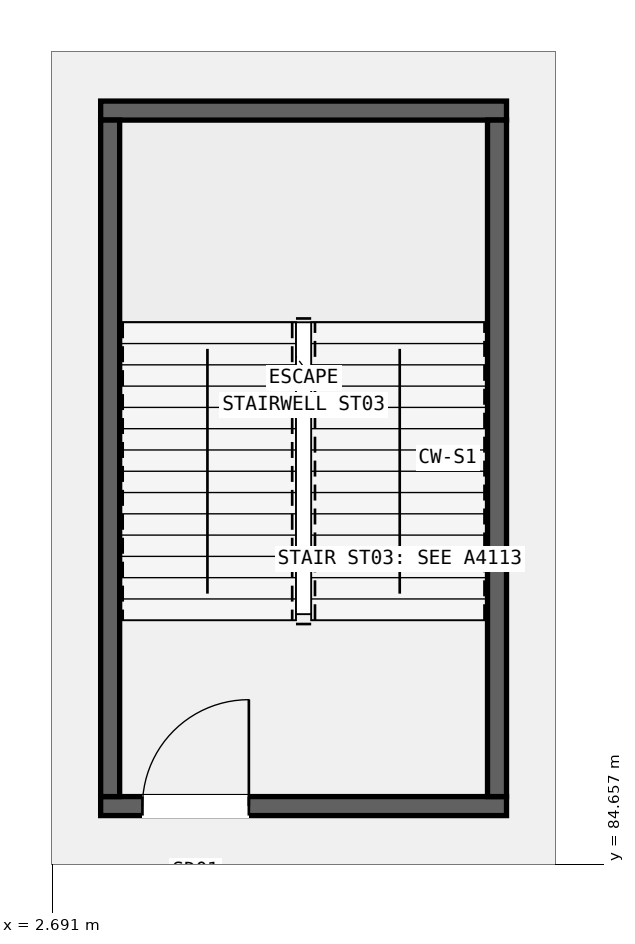
"""IFC4 building model, lengths in metres.
Left out: names, types, materials, properties, quantities, classifications, styles, units other than length and angle.
Written with IfcOpenShell. Run it as: python <this file> out.ifc"""

import sys

from ifc_helpers import new_model, si_unit, direction, frame, frame_2d, origin, place, context, subcontext, project, spatial, rectangle, extrude, element, fill, save


model = new_model("IFC4")
c1 = context("Model", 3, precision=1e-05, world=origin(), true_north=direction((0.0, 1.0)))
c2 = subcontext(c1, "Body", "Model", "MODEL_VIEW")
j1 = project(units=[si_unit("LENGTHUNIT", "METRE"), si_unit("PLANEANGLEUNIT", "RADIAN")], contexts=[c1])
p1 = place(None, origin())
s1 = spatial("IfcSite", under=j1, at=p1, CompositionType="ELEMENT")
p2 = place(p1, origin())
s2 = spatial("IfcBuilding", under=s1, at=p2, CompositionType="ELEMENT")
p3 = place(p2, frame((0.0, 0.0, 10.2)))
s3 = spatial("IfcBuildingStorey", under=s2, at=p3, CompositionType="ELEMENT", Elevation=10.2)
p4 = place(p3, frame((3.33, 85.425, 0.0), z_axis=(0.0, 0.0, 1.0), x_axis=(1.0, 0.0, 0.0)))
e1 = element("IfcWall", 1, at=p4, inside=s3, PredefinedType="SHEAR", context=c2, shape_type="SweptSolid", body=[
    extrude(rectangle(XDim=5.34, YDim=0.25, at=frame_2d((2.67, 0.0))), origin(), (0.0, 0.0, 1.0), 4.82),
])
p5 = place(p4, frame((0.55, 0.0, 0.0)))
e2 = element("IfcOpeningElement", 2, at=p5, cuts=e1, PredefinedType="OPENING", context=c2, shape_type="SweptSolid", body=[
    extrude(rectangle(XDim=1.4, YDim=2.15, at=frame_2d((0.7, 1.075))), frame((0.0, 0.135, 0.0), z_axis=(0.0, -1.0, 0.0), x_axis=(1.0, 0.0, 0.0)), (0.0, 0.0, 1.0), 0.27),
])
p6 = place(p3, frame((3.33, 94.575, 0.0), z_axis=(0.0, 0.0, 1.0), x_axis=(1.0, 0.0, 0.0)))
e3 = element("IfcWall", 3, at=p6, inside=s3, PredefinedType="SHEAR", context=c2, shape_type="SweptSolid", body=[
    extrude(rectangle(XDim=5.34, YDim=0.25, at=frame_2d((2.67, 0.0))), origin(), (0.0, 0.0, 1.0), 4.82),
])
for number, where, z_axis, x_axis in (
    (4, (3.455, 85.55, 0.0), (0.0, 0.0, 1.0), (0.0, 1.0, 0.0)),
    (5, (8.545, 85.55, 0.0), (0.0, 0.0, 1.0), (0.0, 1.0, 0.0)),
):
    element("IfcWall", number, at=place(p3, frame(where, z_axis=z_axis, x_axis=x_axis)), inside=s3, PredefinedType="SHEAR", context=c2, shape_type="SweptSolid", body=[
        extrude(rectangle(XDim=8.9, YDim=0.25, at=frame_2d((4.45, 0.0))), origin(), (0.0, 0.0, 1.0), 4.82),
    ])
p7 = place(p5, origin())
e6 = element("IfcDoor", 6, at=p7, inside=s3, OperationType="SINGLE_SWING_RIGHT", PredefinedType="DOOR", context=c2, shape_type="SweptSolid", body=[
    extrude(rectangle(XDim=1.4, YDim=2.15, at=frame_2d((0.7, 1.075))), frame((0.0, 0.025, 0.0), z_axis=(0.0, -1.0, 0.0), x_axis=(1.0, 0.0, 0.0)), (0.0, 0.0, 1.0), 0.05),
])
fill(e2, e6)
save(model, sys.argv[1])
